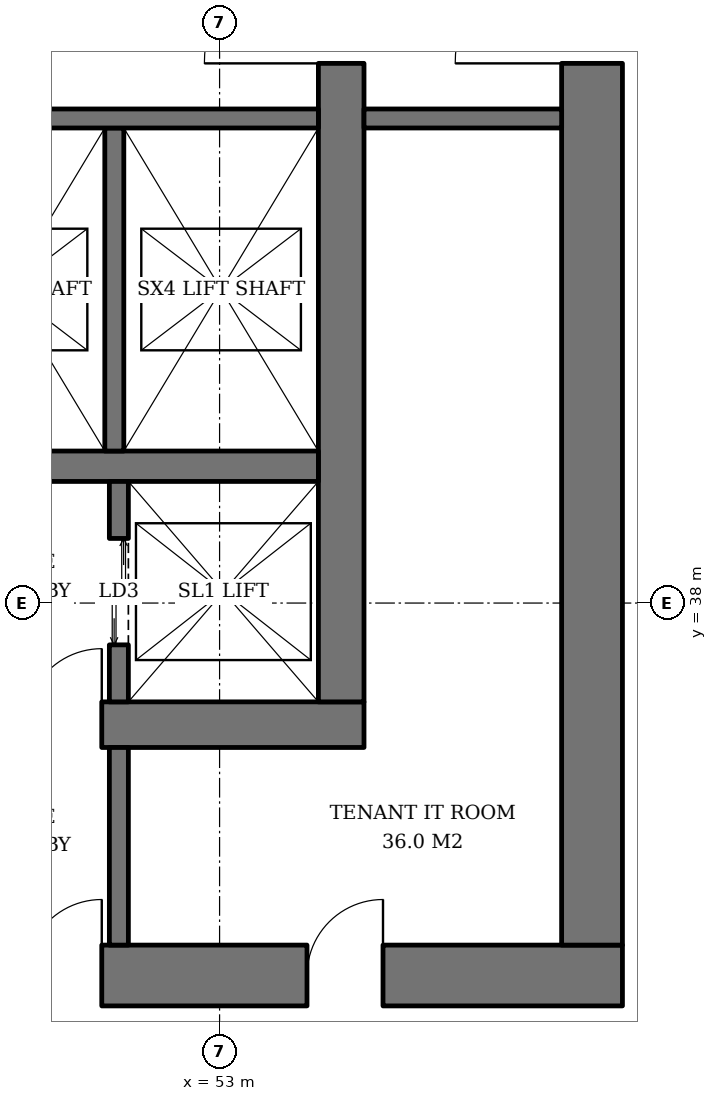
"""IFC4 building model, lengths in metres.
Left out: names, types, materials, properties, quantities, classifications, styles, units other than length and angle.
Written with IfcOpenShell. Run it as: python <this file> out.ifc"""

import sys

from ifc_helpers import new_model, si_unit, direction, frame, frame_2d, origin, place, context, subcontext, project, spatial, rectangle, extrude, element, fill, save


model = new_model("IFC4")
c1 = context("Model", 3, precision=1e-05, world=origin(), true_north=direction((0.0, 1.0)))
c2 = subcontext(c1, "Body", "Model", "MODEL_VIEW")
j1 = project(units=[si_unit("LENGTHUNIT", "METRE"), si_unit("PLANEANGLEUNIT", "RADIAN")], contexts=[c1])
p1 = place(None, origin())
s1 = spatial("IfcSite", under=j1, at=p1, CompositionType="ELEMENT")
p2 = place(p1, origin())
s2 = spatial("IfcBuilding", under=s1, at=p2, CompositionType="ELEMENT")
p3 = place(p2, frame((0.0, 0.0, 51.4)))
s3 = spatial("IfcBuildingStorey", under=s2, at=p3, CompositionType="ELEMENT", Elevation=51.4)
p4 = place(p3, frame((35.1, 36.4, 0.0), z_axis=(0.0, 0.0, 1.0), x_axis=(1.0, 0.0, 0.0)))
e1 = element("IfcWall", 1, at=p4, inside=s3, PredefinedType="SHEAR", context=c2, shape_type="SweptSolid", body=[
    extrude(rectangle(XDim=19.8, YDim=0.6, at=frame_2d((9.9, 0.0))), origin(), (0.0, 0.0, 1.0), 3.8),
])
p5 = place(p4, frame((3.9, 0.0, 0.0)))
e2 = element("IfcOpeningElement", 2, at=p5, cuts=e1, PredefinedType="OPENING", context=c2, shape_type="SweptSolid", body=[
    extrude(rectangle(XDim=1.0, YDim=2.1, at=frame_2d((0.5, 1.05))), frame((0.0, 0.31, 0.0), z_axis=(0.0, -1.0, 0.0), x_axis=(1.0, 0.0, 0.0)), (0.0, 0.0, 1.0), 0.62),
])
p6 = place(p4, frame((15.35, 0.0, 0.0)))
e3 = element("IfcOpeningElement", 3, at=p6, cuts=e1, PredefinedType="OPENING", context=c2, shape_type="SweptSolid", body=[
    extrude(rectangle(XDim=1.0, YDim=2.1, at=frame_2d((0.5, 1.05))), frame((0.0, 0.31, 0.0), z_axis=(0.0, -1.0, 0.0), x_axis=(1.0, 0.0, 0.0)), (0.0, 0.0, 1.0), 0.62),
])
p7 = place(p3, frame((54.6, 36.7, 0.0), z_axis=(0.0, 0.0, 1.0), x_axis=(0.0, 1.0, 0.0)))
e4 = element("IfcWall", 4, at=p7, inside=s3, PredefinedType="SHEAR", context=c2, shape_type="SweptSolid", body=[
    extrude(rectangle(XDim=18.6, YDim=0.6, at=frame_2d((9.3, 0.0))), origin(), (0.0, 0.0, 1.0), 3.8),
])
p8 = place(p7, frame((8.4, 0.0, 0.0)))
e5 = element("IfcOpeningElement", 5, at=p8, cuts=e4, PredefinedType="OPENING", context=c2, shape_type="SweptSolid", body=[
    extrude(rectangle(XDim=1.8, YDim=2.4, at=frame_2d((0.9, 1.2))), frame((0.0, 0.31, 0.0), z_axis=(0.0, -1.0, 0.0), x_axis=(1.0, 0.0, 0.0)), (0.0, 0.0, 1.0), 0.62),
])
p9 = place(p3, frame((31.7, 33.1, 0.0), z_axis=(0.0, 0.0, 1.0), x_axis=(1.0, 0.0, 0.0)))
e6 = element("IfcWall", 6, at=p9, inside=s3, PredefinedType="SHEAR", context=c2, shape_type="SweptSolid", body=[
    extrude(rectangle(XDim=26.6, YDim=0.8, at=frame_2d((13.3, 0.0))), origin(), (0.0, 0.0, 1.0), 3.8),
])
p10 = place(p9, frame((7.3, 0.0, 0.0)))
e7 = element("IfcOpeningElement", 7, at=p10, cuts=e6, PredefinedType="OPENING", context=c2, shape_type="SweptSolid", body=[
    extrude(rectangle(XDim=1.0, YDim=2.1, at=frame_2d((0.5, 1.05))), frame((0.0, 0.41, 0.0), z_axis=(0.0, -1.0, 0.0), x_axis=(1.0, 0.0, 0.0)), (0.0, 0.0, 1.0), 0.82),
])
p11 = place(p9, frame((18.75, 0.0, 0.0)))
e8 = element("IfcOpeningElement", 8, at=p11, cuts=e6, PredefinedType="OPENING", context=c2, shape_type="SweptSolid", body=[
    extrude(rectangle(XDim=1.0, YDim=2.1, at=frame_2d((0.5, 1.05))), frame((0.0, 0.41, 0.0), z_axis=(0.0, -1.0, 0.0), x_axis=(1.0, 0.0, 0.0)), (0.0, 0.0, 1.0), 0.82),
])
p12 = place(p9, frame((3.25, 0.0, 0.0)))
e9 = element("IfcOpeningElement", 9, at=p12, cuts=e6, PredefinedType="OPENING", context=c2, shape_type="SweptSolid", body=[
    extrude(rectangle(XDim=1.0, YDim=2.1, at=frame_2d((0.5, 1.05))), frame((0.0, 0.41, 0.0), z_axis=(0.0, -1.0, 0.0), x_axis=(1.0, 0.0, 0.0)), (0.0, 0.0, 1.0), 0.82),
])
p13 = place(p9, frame((10.42, 0.0, 0.0)))
e10 = element("IfcOpeningElement", 10, at=p13, cuts=e6, PredefinedType="OPENING", context=c2, shape_type="SweptSolid", body=[
    extrude(rectangle(XDim=1.0, YDim=2.1, at=frame_2d((0.5, 1.05))), frame((0.0, 0.41, 0.0), z_axis=(0.0, -1.0, 0.0), x_axis=(1.0, 0.0, 0.0)), (0.0, 0.0, 1.0), 0.82),
])
p14 = place(p9, frame((14.46, 0.0, 0.0)))
e11 = element("IfcOpeningElement", 11, at=p14, cuts=e6, PredefinedType="OPENING", context=c2, shape_type="SweptSolid", body=[
    extrude(rectangle(XDim=1.0, YDim=2.1, at=frame_2d((0.5, 1.05))), frame((0.0, 0.41, 0.0), z_axis=(0.0, -1.0, 0.0), x_axis=(1.0, 0.0, 0.0)), (0.0, 0.0, 1.0), 0.82),
])
p15 = place(p9, frame((22.45, 0.0, 0.0)))
e12 = element("IfcOpeningElement", 12, at=p15, cuts=e6, PredefinedType="OPENING", context=c2, shape_type="SweptSolid", body=[
    extrude(rectangle(XDim=1.0, YDim=2.1, at=frame_2d((0.5, 1.05))), frame((0.0, 0.41, 0.0), z_axis=(0.0, -1.0, 0.0), x_axis=(1.0, 0.0, 0.0)), (0.0, 0.0, 1.0), 0.82),
])
p16 = place(p3, frame((57.9, 33.5, 0.0), z_axis=(0.0, 0.0, 1.0), x_axis=(0.0, 1.0, 0.0)))
e13 = element("IfcWall", 13, at=p16, inside=s3, PredefinedType="SHEAR", context=c2, shape_type="SweptSolid", body=[
    extrude(rectangle(XDim=25.0, YDim=0.8, at=frame_2d((12.5, 0.0))), origin(), (0.0, 0.0, 1.0), 3.8),
])
p17 = place(p16, frame((11.6, 0.0, 0.0)))
e14 = element("IfcOpeningElement", 14, at=p17, cuts=e13, PredefinedType="OPENING", context=c2, shape_type="SweptSolid", body=[
    extrude(rectangle(XDim=1.8, YDim=2.4, at=frame_2d((0.9, 1.2))), frame((0.0, 0.41, 0.0), z_axis=(0.0, -1.0, 0.0), x_axis=(1.0, 0.0, 0.0)), (0.0, 0.0, 1.0), 0.82),
])
p18 = place(p3, frame((35.7, 39.8, 0.0), z_axis=(0.0, 0.0, 1.0), x_axis=(1.0, 0.0, 0.0)))
e15 = element("IfcWall", 15, at=p18, inside=s3, PredefinedType="SHEAR", context=c2, shape_type="SweptSolid", body=[
    extrude(rectangle(XDim=18.6, YDim=0.4, at=frame_2d((9.3, 0.0))), origin(), (0.0, 0.0, 1.0), 3.8),
])
p19 = place(p3, frame((51.675, 36.7, 0.0), z_axis=(0.0, 0.0, 1.0), x_axis=(0.0, 1.0, 0.0)))
e16 = element("IfcWall", 16, at=p19, inside=s3, PredefinedType="SHEAR", context=c2, shape_type="SweptSolid", body=[
    extrude(rectangle(XDim=2.9, YDim=0.25, at=frame_2d((1.45, 0.0))), origin(), (0.0, 0.0, 1.0), 3.8),
])
p20 = place(p19, frame((0.75, 0.0, 0.0)))
e17 = element("IfcOpeningElement", 17, at=p20, cuts=e16, PredefinedType="OPENING", context=c2, shape_type="SweptSolid", body=[
    extrude(rectangle(XDim=1.4, YDim=2.4, at=frame_2d((0.7, 1.2))), frame((0.0, 0.135, 0.0), z_axis=(0.0, -1.0, 0.0), x_axis=(1.0, 0.0, 0.0)), (0.0, 0.0, 1.0), 0.27),
])
p21 = place(p3, frame((51.615, 44.25, 0.0), z_axis=(0.0, 0.0, 1.0), x_axis=(0.0, -1.0, 0.0)))
e18 = element("IfcWall", 18, at=p21, inside=s3, PredefinedType="SHEAR", context=c2, shape_type="SweptSolid", body=[
    extrude(rectangle(XDim=4.25, YDim=0.25, at=frame_2d((2.125, 0.0))), origin(), (0.0, 0.0, 1.0), 3.8),
])
p22 = place(p3, frame((48.93, 44.375, 0.0), z_axis=(0.0, 0.0, 1.0), x_axis=(1.0, 0.0, 0.0)))
e19 = element("IfcWall", 19, at=p22, inside=s3, PredefinedType="SHEAR", context=c2, shape_type="SweptSolid", body=[
    extrude(rectangle(XDim=5.37, YDim=0.25, at=frame_2d((2.685, 0.0))), origin(), (0.0, 0.0, 1.0), 3.8),
])
for number, where, z_axis, x_axis in (
    (20, (54.9, 44.375, 0.0), (0.0, 0.0, 1.0), (1.0, 0.0, 0.0)),
    (21, (51.675, 33.5, 0.0), (0.0, 0.0, 1.0), (0.0, 1.0, 0.0)),
):
    element("IfcWall", number, at=place(p3, frame(where, z_axis=z_axis, x_axis=x_axis)), inside=s3, PredefinedType="SOLIDWALL", context=c2, shape_type="SweptSolid", body=[
        extrude(rectangle(XDim=2.6, YDim=0.25, at=frame_2d((1.3, 0.0))), origin(), (0.0, 0.0, 1.0), 3.62),
    ])
p23 = place(p20, origin())
e22 = element("IfcDoor", 22, at=p23, inside=s3, OperationType="DOUBLE_DOOR_SLIDING", PredefinedType="DOOR", context=c2, shape_type="SweptSolid", body=[
    extrude(rectangle(XDim=1.4, YDim=2.4, at=frame_2d((0.7, 1.2))), frame((0.0, 0.025, 0.0), z_axis=(0.0, -1.0, 0.0), x_axis=(1.0, 0.0, 0.0)), (0.0, 0.0, 1.0), 0.05),
])
fill(e17, e22)
p24 = place(p8, origin())
e23 = element("IfcDoor", 23, at=p24, inside=s3, OperationType="DOUBLE_DOOR_SINGLE_SWING", PredefinedType="DOOR", context=c2, shape_type="SweptSolid", body=[
    extrude(rectangle(XDim=1.8, YDim=2.4, at=frame_2d((0.9, 1.2))), frame((0.0, 0.025, 0.0), z_axis=(0.0, -1.0, 0.0), x_axis=(1.0, 0.0, 0.0)), (0.0, 0.0, 1.0), 0.05),
])
fill(e5, e23)
p25 = place(p6, origin())
e24 = element("IfcDoor", 24, at=p25, inside=s3, OperationType="SINGLE_SWING_RIGHT", PredefinedType="DOOR", context=c2, shape_type="SweptSolid", body=[
    extrude(rectangle(XDim=1.0, YDim=2.1, at=frame_2d((0.5, 1.05))), frame((0.0, 0.025, 0.0), z_axis=(0.0, -1.0, 0.0), x_axis=(1.0, 0.0, 0.0)), (0.0, 0.0, 1.0), 0.05),
])
fill(e3, e24)
p26 = place(p17, origin())
e25 = element("IfcDoor", 25, at=p26, inside=s3, OperationType="DOUBLE_DOOR_SINGLE_SWING", PredefinedType="DOOR", context=c2, shape_type="SweptSolid", body=[
    extrude(rectangle(XDim=1.8, YDim=2.4, at=frame_2d((0.9, 1.2))), frame((0.0, 0.025, 0.0), z_axis=(0.0, -1.0, 0.0), x_axis=(1.0, 0.0, 0.0)), (0.0, 0.0, 1.0), 0.05),
])
fill(e14, e25)
p27 = place(p11, origin())
e26 = element("IfcDoor", 26, at=p27, inside=s3, OperationType="SINGLE_SWING_RIGHT", PredefinedType="DOOR", context=c2, shape_type="SweptSolid", body=[
    extrude(rectangle(XDim=1.0, YDim=2.1, at=frame_2d((0.5, 1.05))), frame((0.0, 0.025, 0.0), z_axis=(0.0, -1.0, 0.0), x_axis=(1.0, 0.0, 0.0)), (0.0, 0.0, 1.0), 0.05),
])
fill(e8, e26)
p28 = place(p15, origin())
e27 = element("IfcDoor", 27, at=p28, inside=s3, OperationType="SINGLE_SWING_RIGHT", PredefinedType="DOOR", context=c2, shape_type="SweptSolid", body=[
    extrude(rectangle(XDim=1.0, YDim=2.1, at=frame_2d((0.5, 1.05))), frame((0.0, 0.39, 0.0), z_axis=(0.0, -1.0, 0.0), x_axis=(1.0, 0.0, 0.0)), (0.0, 0.0, 1.0), 0.05),
])
fill(e12, e27)
save(model, sys.argv[1])
